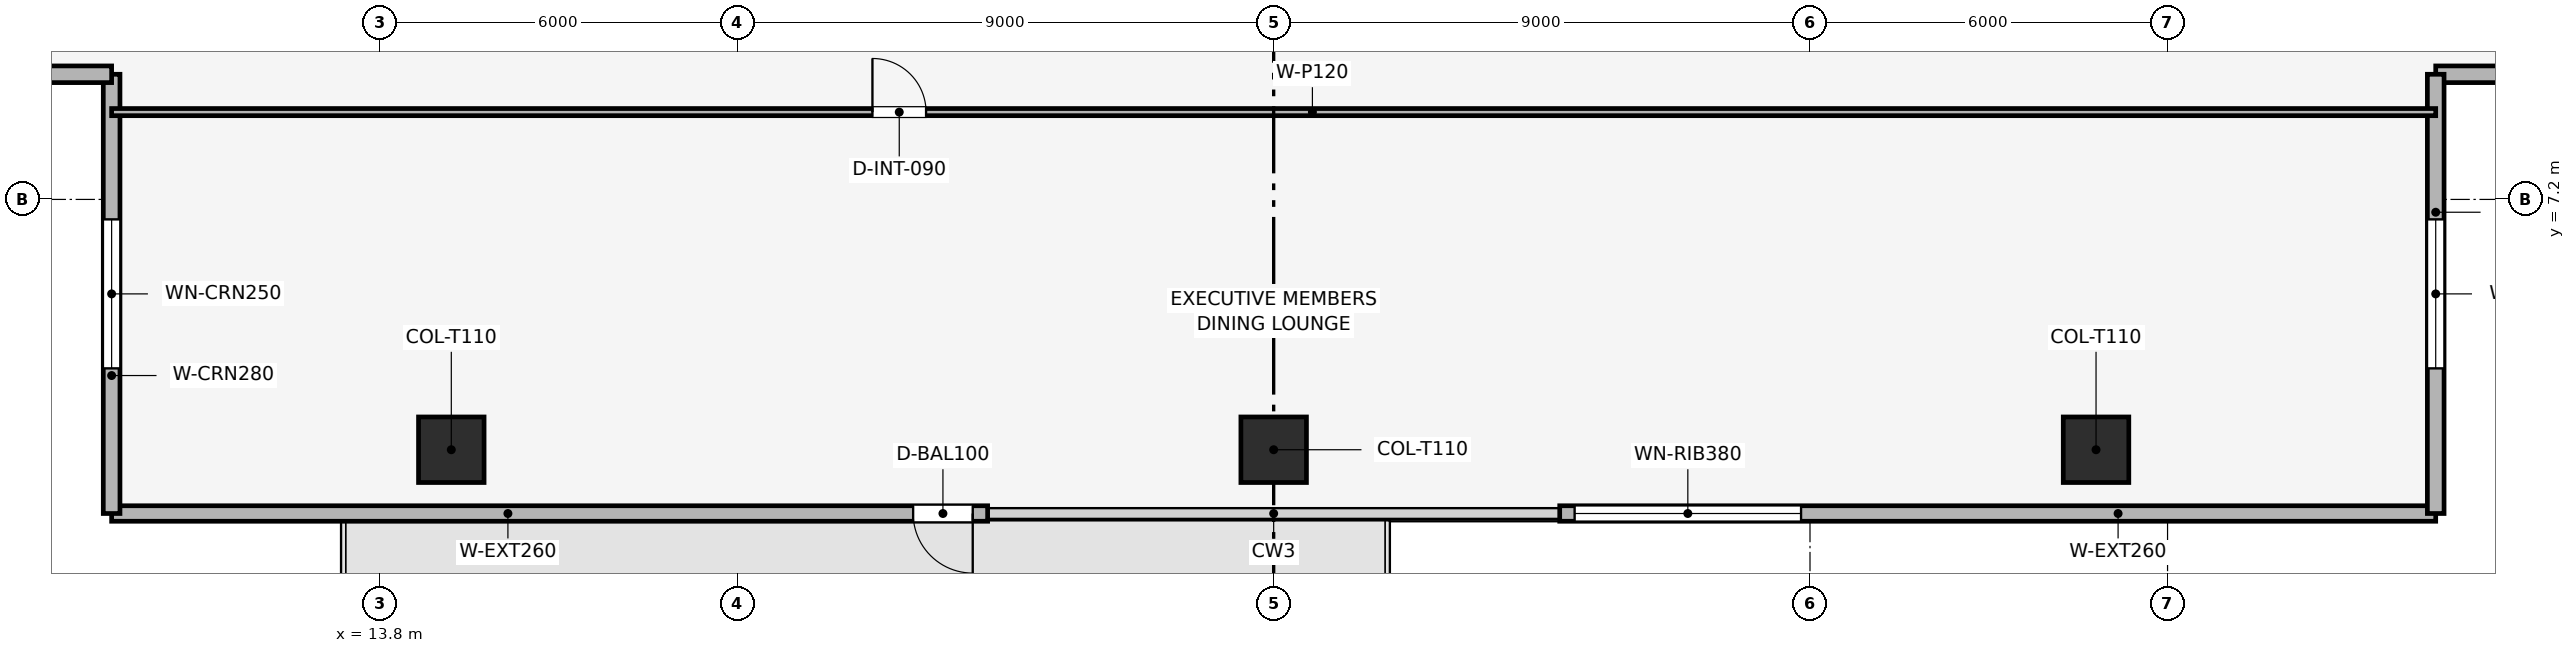
"""IFC4 building model, lengths in metres.
Left out: names, types, materials, properties, quantities, classifications, styles, units other than length and angle.
Written with IfcOpenShell. Run it as: python <this file> out.ifc"""

import sys

from ifc_helpers import new_model, si_unit, direction, frame, frame_2d, origin, origin_2d, place, context, subcontext, project, spatial, rectangle, extrude, element, fill, save


model = new_model("IFC4")
c1 = context("Model", 3, precision=1e-05, world=origin(), true_north=direction((0.0, 1.0)))
c2 = subcontext(c1, "Body", "Model", "MODEL_VIEW")
j1 = project(units=[si_unit("LENGTHUNIT", "METRE"), si_unit("PLANEANGLEUNIT", "RADIAN")], contexts=[c1])
p1 = place(None, origin())
s1 = spatial("IfcSite", under=j1, at=p1, CompositionType="ELEMENT")
p2 = place(p1, origin())
s2 = spatial("IfcBuilding", under=s1, at=p2, CompositionType="ELEMENT")
p3 = place(p2, frame((0.0, 0.0, 207.45)))
s3 = spatial("IfcBuildingStorey", under=s2, at=p3, CompositionType="ELEMENT", Elevation=207.45)
for number, where, z_axis, x_axis in (
    (1, (15.0, 3.0, 0.003), (0.0, 0.0, 1.0), (1.0, 0.0, 0.0)),
    (2, (28.8, 3.0, 0.003), (0.0, 0.0, 1.0), (1.0, 0.0, 0.0)),
    (3, (42.6, 3.0, 0.003), (0.0, 0.0, 1.0), (1.0, 0.0, 0.0)),
):
    element("IfcColumn", number, at=place(p3, frame(where, z_axis=z_axis, x_axis=x_axis)), inside=s3, PredefinedType="COLUMN", context=c2, shape_type="SweptSolid", body=[
        extrude(rectangle(XDim=1.1, YDim=1.1, at=origin_2d()), origin(), (0.0, 0.0, 1.0), 3.494),
    ])
p4 = place(p3, frame((48.3, 1.93, 0.0), z_axis=(0.0, 0.0, 1.0), x_axis=(-1.0, 0.0, 0.0)))
e4 = element("IfcWall", 4, at=p4, inside=s3, PredefinedType="SOLIDWALL", context=c2, shape_type="SweptSolid", body=[
    extrude(rectangle(XDim=14.7, YDim=0.26, at=frame_2d((7.35, 0.0))), origin(), (0.0, 0.0, 1.0), 3.5),
])
p5 = place(p4, frame((10.65, 0.0, 0.9)))
e5 = element("IfcOpeningElement", 5, at=p5, cuts=e4, PredefinedType="OPENING", context=c2, shape_type="SweptSolid", body=[
    extrude(rectangle(XDim=3.8, YDim=1.9, at=frame_2d((1.9, 0.95))), frame((0.0, 0.14, 0.0), z_axis=(0.0, -1.0, 0.0), x_axis=(1.0, 0.0, 0.0)), (0.0, 0.0, 1.0), 0.28),
])
p6 = place(p3, frame((24.0, 1.93, 0.0), z_axis=(0.0, 0.0, 1.0), x_axis=(-1.0, 0.0, 0.0)))
e6 = element("IfcWall", 6, at=p6, inside=s3, PredefinedType="SOLIDWALL", context=c2, shape_type="SweptSolid", body=[
    extrude(rectangle(XDim=14.7, YDim=0.26, at=frame_2d((7.35, 0.0))), origin(), (0.0, 0.0, 1.0), 3.5),
])
p7 = place(p6, frame((0.25, 0.0, 0.0)))
e7 = element("IfcOpeningElement", 7, at=p7, cuts=e6, PredefinedType="OPENING", context=c2, shape_type="SweptSolid", body=[
    extrude(rectangle(XDim=1.0, YDim=2.2, at=frame_2d((0.5, 1.1))), frame((0.0, 0.14, 0.0), z_axis=(0.0, -1.0, 0.0), x_axis=(1.0, 0.0, 0.0)), (0.0, 0.0, 1.0), 0.28),
])
p8 = place(p3, frame((9.3, 1.93, 0.0), z_axis=(0.0, 0.0, 1.0), x_axis=(0.0, 1.0, 0.0)))
e8 = element("IfcWall", 8, at=p8, inside=s3, PredefinedType="SOLIDWALL", context=c2, shape_type="SweptSolid", body=[
    extrude(rectangle(XDim=7.37, YDim=0.28, at=frame_2d((3.685, 0.0))), origin(), (0.0, 0.0, 1.0), 3.5),
])
p9 = place(p8, frame((2.435, 0.0, 0.9)))
e9 = element("IfcOpeningElement", 9, at=p9, cuts=e8, PredefinedType="OPENING", context=c2, shape_type="SweptSolid", body=[
    extrude(rectangle(XDim=2.5, YDim=1.9, at=frame_2d((1.25, 0.95))), frame((0.0, 0.15, 0.0), z_axis=(0.0, -1.0, 0.0), x_axis=(1.0, 0.0, 0.0)), (0.0, 0.0, 1.0), 0.3),
])
p10 = place(p3, frame((9.3, 9.3, 0.0), z_axis=(0.0, 0.0, 1.0), x_axis=(-1.0, 0.0, 0.0)))
e10 = element("IfcWall", 10, at=p10, inside=s3, PredefinedType="SOLIDWALL", context=c2, shape_type="SweptSolid", body=[
    extrude(rectangle(XDim=7.37, YDim=0.28, at=frame_2d((3.685, 0.0))), origin(), (0.0, 0.0, 1.0), 3.5),
])
p11 = place(p10, frame((2.435, 0.0, 0.9)))
e11 = element("IfcOpeningElement", 11, at=p11, cuts=e10, PredefinedType="OPENING", context=c2, shape_type="SweptSolid", body=[
    extrude(rectangle(XDim=2.5, YDim=1.9, at=frame_2d((1.25, 0.95))), frame((0.0, 0.15, 0.0), z_axis=(0.0, -1.0, 0.0), x_axis=(1.0, 0.0, 0.0)), (0.0, 0.0, 1.0), 0.3),
])
p12 = place(p3, frame((55.67, 9.3, 0.0), z_axis=(0.0, 0.0, 1.0), x_axis=(-1.0, 0.0, 0.0)))
e12 = element("IfcWall", 12, at=p12, inside=s3, PredefinedType="SOLIDWALL", context=c2, shape_type="SweptSolid", body=[
    extrude(rectangle(XDim=7.37, YDim=0.28, at=frame_2d((3.685, 0.0))), origin(), (0.0, 0.0, 1.0), 3.5),
])
p13 = place(p12, frame((2.435, 0.0, 0.9)))
e13 = element("IfcOpeningElement", 13, at=p13, cuts=e12, PredefinedType="OPENING", context=c2, shape_type="SweptSolid", body=[
    extrude(rectangle(XDim=2.5, YDim=1.9, at=frame_2d((1.25, 0.95))), frame((0.0, 0.15, 0.0), z_axis=(0.0, -1.0, 0.0), x_axis=(1.0, 0.0, 0.0)), (0.0, 0.0, 1.0), 0.3),
])
p14 = place(p3, frame((48.3, 9.3, 0.0), z_axis=(0.0, 0.0, 1.0), x_axis=(0.0, -1.0, 0.0)))
e14 = element("IfcWall", 14, at=p14, inside=s3, PredefinedType="SOLIDWALL", context=c2, shape_type="SweptSolid", body=[
    extrude(rectangle(XDim=7.37, YDim=0.28, at=frame_2d((3.685, 0.0))), origin(), (0.0, 0.0, 1.0), 3.5),
])
p15 = place(p14, frame((2.435, 0.0, 0.9)))
e15 = element("IfcOpeningElement", 15, at=p15, cuts=e14, PredefinedType="OPENING", context=c2, shape_type="SweptSolid", body=[
    extrude(rectangle(XDim=2.5, YDim=1.9, at=frame_2d((1.25, 0.95))), frame((0.0, 0.15, 0.0), z_axis=(0.0, -1.0, 0.0), x_axis=(1.0, 0.0, 0.0)), (0.0, 0.0, 1.0), 0.3),
])
p16 = place(p3, frame((9.3, 8.665, 0.0), z_axis=(0.0, 0.0, 1.0), x_axis=(1.0, 0.0, 0.0)))
e16 = element("IfcWall", 16, at=p16, inside=s3, PredefinedType="PARTITIONING", context=c2, shape_type="SweptSolid", body=[
    extrude(rectangle(XDim=39.0, YDim=0.12, at=frame_2d((19.5, 0.0))), origin(), (0.0, 0.0, 1.0), 2.885),
])
p17 = place(p16, frame((12.767, 0.0, 0.0)))
e17 = element("IfcOpeningElement", 17, at=p17, cuts=e16, PredefinedType="OPENING", context=c2, shape_type="SweptSolid", body=[
    extrude(rectangle(XDim=0.9, YDim=2.1, at=frame_2d((0.45, 1.05))), frame((0.0, 0.07, 0.0), z_axis=(0.0, -1.0, 0.0), x_axis=(1.0, 0.0, 0.0)), (0.0, 0.0, 1.0), 0.14),
])
p18 = place(p7, origin())
e18 = element("IfcDoor", 18, at=p18, inside=s3, OperationType="SINGLE_SWING_LEFT", PredefinedType="DOOR", context=c2, shape_type="SweptSolid", body=[
    extrude(rectangle(XDim=1.0, YDim=2.2, at=frame_2d((0.5, 1.1))), frame((0.0, 0.025, 0.0), z_axis=(0.0, -1.0, 0.0), x_axis=(1.0, 0.0, 0.0)), (0.0, 0.0, 1.0), 0.05),
])
fill(e7, e18)
p19 = place(p5, origin())
e19 = element("IfcWindow", 19, at=p19, inside=s3, PartitioningType="SINGLE_PANEL", PredefinedType="WINDOW", context=c2, shape_type="SweptSolid", body=[
    extrude(rectangle(XDim=3.8, YDim=1.9, at=frame_2d((1.9, 0.95))), frame((0.0, 0.03, 0.0), z_axis=(0.0, -1.0, 0.0), x_axis=(1.0, 0.0, 0.0)), (0.0, 0.0, 1.0), 0.06),
])
fill(e5, e19)
p20 = place(p9, origin())
e20 = element("IfcWindow", 20, at=p20, inside=s3, PartitioningType="SINGLE_PANEL", PredefinedType="WINDOW", context=c2, shape_type="SweptSolid", body=[
    extrude(rectangle(XDim=2.5, YDim=1.9, at=frame_2d((1.25, 0.95))), frame((0.0, 0.03, 0.0), z_axis=(0.0, -1.0, 0.0), x_axis=(1.0, 0.0, 0.0)), (0.0, 0.0, 1.0), 0.06),
])
fill(e9, e20)
p21 = place(p15, origin())
e21 = element("IfcWindow", 21, at=p21, inside=s3, PartitioningType="SINGLE_PANEL", PredefinedType="WINDOW", context=c2, shape_type="SweptSolid", body=[
    extrude(rectangle(XDim=2.5, YDim=1.9, at=frame_2d((1.25, 0.95))), frame((0.0, 0.03, 0.0), z_axis=(0.0, -1.0, 0.0), x_axis=(1.0, 0.0, 0.0)), (0.0, 0.0, 1.0), 0.06),
])
fill(e15, e21)
p22 = place(p17, origin())
e22 = element("IfcDoor", 22, at=p22, inside=s3, OperationType="SINGLE_SWING_LEFT", PredefinedType="DOOR", context=c2, shape_type="SweptSolid", body=[
    extrude(rectangle(XDim=0.9, YDim=2.1, at=frame_2d((0.45, 1.05))), frame((0.0, 0.025, 0.0), z_axis=(0.0, -1.0, 0.0), x_axis=(1.0, 0.0, 0.0)), (0.0, 0.0, 1.0), 0.05),
])
fill(e17, e22)
save(model, sys.argv[1])
